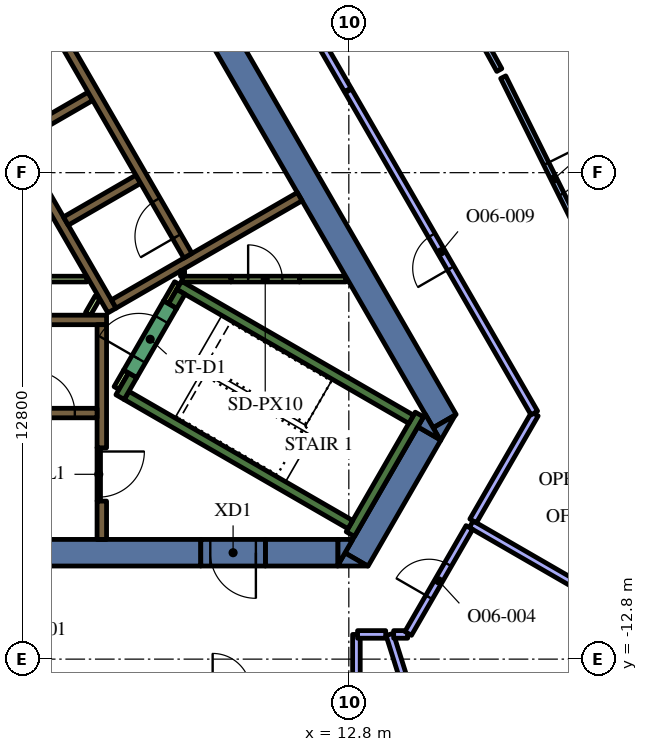
"""IFC4 building model, lengths in metres.
Left out: names, types, materials, properties, quantities, classifications, styles, units other than length and angle.
Written with IfcOpenShell. Run it as: python <this file> out.ifc"""

import sys

from ifc_helpers import new_model, si_unit, direction, frame, frame_2d, origin, place, context, subcontext, project, spatial, polyline, rectangle, outline, extrude, element, fill, save


model = new_model("IFC4")
c1 = context("Model", 3, precision=1e-05, world=origin(), true_north=direction((0.0, 1.0)))
c2 = subcontext(c1, "Body", "Model", "MODEL_VIEW")
j1 = project(units=[si_unit("LENGTHUNIT", "METRE"), si_unit("PLANEANGLEUNIT", "RADIAN")], contexts=[c1])
p1 = place(None, origin())
s1 = spatial("IfcSite", under=j1, at=p1, CompositionType="ELEMENT")
p2 = place(p1, origin())
s2 = spatial("IfcBuilding", under=s1, at=p2, CompositionType="ELEMENT")
p3 = place(p2, frame((0.0, 0.0, 205.8)))
s3 = spatial("IfcBuildingStorey", under=s2, at=p3, CompositionType="ELEMENT", Elevation=205.8)
p4 = place(p3, frame((9.085, 4.264, 0.0), z_axis=(0.0, 0.0, 1.0), x_axis=(0.499998082512, -0.866026510844, 0.0)))
e1 = element("IfcWall", 1, at=p4, inside=s3, PredefinedType="SOLIDWALL", context=c2, shape_type="SweptSolid", body=[
    extrude(rectangle(XDim=12.472, YDim=0.7, at=frame_2d((6.236, 0.0))), origin(), (0.0, 0.0, 1.0), 4.2),
])
p5 = place(p3, origin())
e2 = element("IfcWall", 2, at=p5, inside=s3, PredefinedType="SOLIDWALL", context=c2, shape_type="SweptSolid", body=[
    extrude(outline(polyline([(15.213, -7.05), (15.019, -6.714), (15.601, -6.378), (15.213, -7.05)])), origin(), (0.0, 0.0, 1.0), 4.2),
])
p6 = place(p3, frame((13.003, -10.179, 0.0), z_axis=(0.0, 0.0, 1.0), x_axis=(0.499972675833, 0.866041178825, 0.0)))
e3 = element("IfcWall", 3, at=p6, inside=s3, PredefinedType="SOLIDWALL", context=c2, shape_type="SweptSolid", body=[
    extrude(rectangle(XDim=3.829, YDim=0.7, at=frame_2d((1.915, 0.0))), origin(), (0.0, 0.0, 1.0), 4.2),
])
e4 = element("IfcWall", 4, at=p5, inside=s3, PredefinedType="SOLIDWALL", context=c2, shape_type="SweptSolid", body=[
    extrude(outline(polyline([(12.698, -10.005), (13.296, -10.35), (12.5, -10.35), (12.698, -10.005)])), origin(), (0.0, 0.0, 1.0), 4.2),
])
e5 = element("IfcWall", 5, at=p5, inside=s3, PredefinedType="SOLIDWALL", context=c2, shape_type="SweptSolid", body=[
    extrude(outline(polyline([(14.809, -6.35), (15.197, -7.022), (14.615, -6.686), (14.809, -6.35)])), origin(), (0.0, 0.0, 1.0), 4.2),
])
p7 = place(p3, frame((10.604, -10.0, 0.0), z_axis=(0.0, 0.0, 1.0), x_axis=(1.0, 0.0, 0.0)))
e6 = element("IfcWall", 6, at=p7, inside=s3, PredefinedType="SOLIDWALL", context=c2, shape_type="SweptSolid", body=[
    extrude(rectangle(XDim=1.909, YDim=0.7, at=frame_2d((0.955, 0.0))), origin(), (0.0, 0.0, 1.0), 4.2),
])
e7 = element("IfcWall", 7, at=p5, inside=s3, PredefinedType="SOLIDWALL", context=c2, shape_type="SweptSolid", body=[
    extrude(outline(polyline([(12.904, -9.65), (12.516, -10.322), (12.516, -9.65), (12.904, -9.65)])), origin(), (0.0, 0.0, 1.0), 4.2),
])
p8 = place(p3, frame((-10.556, -10.0, 0.0), z_axis=(0.0, 0.0, 1.0), x_axis=(1.0, 0.0, 0.0)))
e8 = element("IfcWall", 8, at=p8, inside=s3, PredefinedType="SOLIDWALL", context=c2, shape_type="SweptSolid", body=[
    extrude(rectangle(XDim=19.461, YDim=0.7, at=frame_2d((9.73, 0.0))), origin(), (0.0, 0.0, 1.0), 4.2),
])
p9 = place(p3, frame((12.84, -9.511, 0.0), z_axis=(0.0, 0.0, 1.0), x_axis=(0.500048121057, 0.865997619297, 0.0)))
e9 = element("IfcWall", 9, at=p9, inside=s3, PredefinedType="SOLIDWALL", context=c2, shape_type="SweptSolid", body=[
    extrude(rectangle(XDim=3.634, YDim=0.25, at=frame_2d((1.817, 0.0))), origin(), (0.0, 0.0, 1.0), 4.2),
])
p10 = place(p3, frame((12.84, -9.261, 0.0), z_axis=(0.0, 0.0, 1.0), x_axis=(-0.866013990052, 0.500019768644, 0.0)))
e10 = element("IfcWall", 10, at=p10, inside=s3, PredefinedType="SOLIDWALL", context=c2, shape_type="SweptSolid", body=[
    extrude(rectangle(XDim=6.8, YDim=0.25, at=frame_2d((3.4, 0.0))), origin(), (0.0, 0.0, 1.0), 4.2),
])
p11 = place(p3, frame((7.113, -5.33, 0.0), z_axis=(0.0, 0.0, 1.0), x_axis=(-0.499965889992, -0.866045096311, 0.0)))
e11 = element("IfcWall", 11, at=p11, inside=s3, PredefinedType="SOLIDWALL", context=c2, shape_type="SweptSolid", body=[
    extrude(rectangle(XDim=0.666, YDim=0.25, at=frame_2d((0.333, 0.0))), origin(), (0.0, 0.0, 1.0), 4.2),
])
p12 = place(p3, frame((8.334, -2.964, 0.0), z_axis=(0.0, 0.0, 1.0), x_axis=(0.866016039709, -0.500016218704, 0.0)))
e12 = element("IfcWall", 12, at=p12, inside=s3, PredefinedType="SOLIDWALL", context=c2, shape_type="SweptSolid", body=[
    extrude(rectangle(XDim=7.05, YDim=0.25, at=frame_2d((3.525, 0.0))), origin(), (0.0, 0.0, 1.0), 4.2),
])
p13 = place(p3, frame((8.163, -3.511, 0.0), z_axis=(0.0, 0.0, 1.0), x_axis=(0.500127794843, 0.865951608824, 0.0)))
e13 = element("IfcWall", 13, at=p13, inside=s3, PredefinedType="SOLIDWALL", context=c2, shape_type="SweptSolid", body=[
    extrude(rectangle(XDim=0.435, YDim=0.25, at=frame_2d((0.217, 0.0))), origin(), (0.0, 0.0, 1.0), 4.2),
])
p14 = place(p3, frame((-5.806, -3.875, 0.0), z_axis=(0.0, 0.0, 1.0), x_axis=(1.0, 0.0, 0.0)))
e14 = element("IfcWall", 14, at=p14, inside=s3, PredefinedType="SOLIDWALL", context=c2, shape_type="SweptSolid", body=[
    extrude(rectangle(XDim=12.231, YDim=0.25, at=frame_2d((6.116, 0.0))), origin(), (0.0, 0.0, 1.0), 4.2),
])
p15 = place(p3, frame((6.3, -7.24, 0.0), z_axis=(0.0, 0.0, 1.0), x_axis=(0.0, 1.0, 0.0)))
e15 = element("IfcWall", 15, at=p15, inside=s3, PredefinedType="SOLIDWALL", context=c2, shape_type="SweptSolid", body=[
    extrude(rectangle(XDim=3.24, YDim=0.25, at=frame_2d((1.62, 0.0))), origin(), (0.0, 0.0, 1.0), 4.2),
])
p16 = place(p3, frame((6.3, -9.65, 0.0), z_axis=(0.0, 0.0, 1.0), x_axis=(0.0, 1.0, 0.0)))
e16 = element("IfcWall", 16, at=p16, inside=s3, PredefinedType="SOLIDWALL", context=c2, shape_type="SweptSolid", body=[
    extrude(rectangle(XDim=1.008, YDim=0.25, at=frame_2d((0.504, 0.0))), origin(), (0.0, 0.0, 1.0), 4.2),
])
e17 = element("IfcWall", 17, at=p5, inside=s3, PredefinedType="SOLIDWALL", context=c2, shape_type="SweptSolid", body=[
    extrude(outline(polyline([(0.332, 6.925), (0.335, 6.925), (0.335, 6.925), (0.335, 6.925), (0.335, 7.075), (0.335, 7.075), (0.335, 7.075), (0.245, 7.075), (0.035, 7.439), (0.252, 7.564), (0.377, 7.348), (1.512, 5.382), (1.637, 5.165), (2.221, 4.153), (2.771, 3.199), (2.896, 2.983), (3.138, 2.564), (4.031, 1.017), (4.156, 0.801), (5.292, -1.165), (5.417, -1.382), (6.073, -2.519), (6.552, -3.348), (6.677, -3.564), (6.46, -3.689), (0.332, 6.925)])), origin(), (0.0, 0.0, 1.0), 4.2),
])
for number, where, z_axis, x_axis in (
    (18, (4.094, 0.909, 0.0), (0.0, 0.0, 1.0), (0.866, 0.5, 0.0)),
    (19, (5.354, -1.274, 0.0), (0.0, 0.0, 1.0), (0.866, 0.5, 0.0)),
):
    element("IfcWall", number, at=place(p3, frame(where, z_axis=z_axis, x_axis=x_axis)), inside=s3, PredefinedType="SOLIDWALL", context=c2, shape_type="SweptSolid", body=[
        extrude(rectangle(XDim=2.2, YDim=0.25, at=frame_2d((1.1, 0.0))), origin(), (0.0, 0.0, 1.0), 4.2),
    ])
p17 = place(p3, frame((11.507, -0.631, 0.0), z_axis=(0.0, 0.0, 1.0), x_axis=(-0.866011447264, -0.500024172624, 0.0)))
e20 = element("IfcWall", 20, at=p17, inside=s3, PredefinedType="SOLIDWALL", context=c2, shape_type="SweptSolid", body=[
    extrude(rectangle(XDim=5.65, YDim=0.25, at=frame_2d((2.825, 0.0))), origin(), (0.0, 0.0, 1.0), 4.2),
])
p18 = place(p3, frame((3.238, -2.8, 0.0), z_axis=(0.0, 0.0, 1.0), x_axis=(1.0, 0.0, 0.0)))
e21 = element("IfcWall", 21, at=p18, inside=s3, PredefinedType="PARTITIONING", context=c2, shape_type="SweptSolid", body=[
    extrude(rectangle(XDim=2.672, YDim=0.15, at=frame_2d((1.336, 0.0))), origin(), (0.0, 0.0, 1.0), 3.45),
])
p19 = place(p3, frame((8.412, -2.8, 0.0), z_axis=(0.0, 0.0, 1.0), x_axis=(1.0, 0.0, 0.0)))
e22 = element("IfcWall", 22, at=p19, inside=s3, PredefinedType="PARTITIONING", context=c2, shape_type="SweptSolid", body=[
    extrude(rectangle(XDim=1.288, YDim=0.15, at=frame_2d((0.644, 0.0))), origin(), (0.0, 0.0, 1.0), 4.2),
])
p20 = place(p3, frame((8.37, -2.65, 0.0), z_axis=(0.0, 0.0, 1.0), x_axis=(1.0, 0.0, 0.0)))
e23 = element("IfcWall", 23, at=p20, inside=s3, PredefinedType="PARTITIONING", context=c2, shape_type="SweptSolid", body=[
    extrude(rectangle(XDim=0.108, YDim=0.15, at=frame_2d((0.054, 0.0))), origin(), (0.0, 0.0, 1.0), 4.2),
])
p21 = place(p3, frame((8.281, -2.907, 0.0), z_axis=(0.0, 0.0, 1.0), x_axis=(-0.500193841991, -0.86591346013, 0.0)))
e24 = element("IfcWall", 24, at=p21, inside=s3, PredefinedType="PARTITIONING", context=c2, shape_type="SweptSolid", body=[
    extrude(rectangle(XDim=0.583, YDim=0.15, at=frame_2d((0.292, 0.0))), origin(), (0.0, 0.0, 1.0), 4.2),
])
p22 = place(p3, frame((11.5, -2.801, 0.0), z_axis=(0.0, 0.0, 1.0), x_axis=(1.0, 0.0, 0.0)))
e25 = element("IfcWall", 25, at=p22, inside=s3, PredefinedType="PARTITIONING", context=c2, shape_type="SweptSolid", body=[
    extrude(rectangle(XDim=1.222, YDim=0.15, at=frame_2d((0.611, 0.0))), origin(), (0.0, 0.0, 1.0), 3.45),
])
p23 = place(p3, frame((6.688, -5.667, 0.0), z_axis=(0.0, 0.0, 1.0), x_axis=(0.499834152157, 0.86612113491, 0.0)))
e26 = element("IfcWall", 26, at=p23, inside=s3, PredefinedType="PARTITIONING", context=c2, shape_type="SweptSolid", body=[
    extrude(rectangle(XDim=0.505, YDim=0.15, at=frame_2d((0.252, 0.0))), origin(), (0.0, 0.0, 1.0), 3.45),
])
p24 = place(p3, frame((5.936, -3.718, 0.0), z_axis=(0.0, 0.0, 1.0), x_axis=(0.499890179513, 0.866088799389, 0.0)))
e27 = element("IfcWall", 27, at=p24, inside=s3, PredefinedType="PARTITIONING", context=c2, shape_type="SweptSolid", body=[
    extrude(rectangle(XDim=0.504, YDim=0.15, at=frame_2d((0.252, 0.0))), origin(), (0.0, 0.0, 1.0), 3.45),
])
p25 = place(p3, frame((-6.175, -6.325, 0.0), z_axis=(0.0, 0.0, 1.0), x_axis=(1.0, 0.0, 0.0)))
e28 = element("IfcWall", 28, at=p25, inside=s3, PredefinedType="SOLIDWALL", context=c2, shape_type="SweptSolid", body=[
    extrude(rectangle(XDim=12.35, YDim=0.25, at=frame_2d((6.175, 0.0))), origin(), (0.0, 0.0, 1.0), 4.2),
])
p26 = place(p25, frame((0.585, 0.0, 0.0)))
e29 = element("IfcOpeningElement", 29, at=p26, cuts=e28, PredefinedType="OPENING", context=c2, shape_type="SweptSolid", body=[
    extrude(rectangle(XDim=1.1, YDim=2.1, at=frame_2d((0.55, 1.05))), frame((0.0, 0.135, 0.0), z_axis=(0.0, -1.0, 0.0), x_axis=(1.0, 0.0, 0.0)), (0.0, 0.0, 1.0), 0.27),
])
p27 = place(p25, frame((3.105, 0.0, 0.0)))
e30 = element("IfcOpeningElement", 30, at=p27, cuts=e28, PredefinedType="OPENING", context=c2, shape_type="SweptSolid", body=[
    extrude(rectangle(XDim=1.1, YDim=2.1, at=frame_2d((0.55, 1.05))), frame((0.0, 0.135, 0.0), z_axis=(0.0, -1.0, 0.0), x_axis=(1.0, 0.0, 0.0)), (0.0, 0.0, 1.0), 0.27),
])
p28 = place(p25, frame((5.625, 0.0, 0.0)))
e31 = element("IfcOpeningElement", 31, at=p28, cuts=e28, PredefinedType="OPENING", context=c2, shape_type="SweptSolid", body=[
    extrude(rectangle(XDim=1.1, YDim=2.1, at=frame_2d((0.55, 1.05))), frame((0.0, 0.135, 0.0), z_axis=(0.0, -1.0, 0.0), x_axis=(1.0, 0.0, 0.0)), (0.0, 0.0, 1.0), 0.27),
])
p29 = place(p25, frame((8.145, 0.0, 0.0)))
e32 = element("IfcOpeningElement", 32, at=p29, cuts=e28, PredefinedType="OPENING", context=c2, shape_type="SweptSolid", body=[
    extrude(rectangle(XDim=1.1, YDim=2.1, at=frame_2d((0.55, 1.05))), frame((0.0, 0.135, 0.0), z_axis=(0.0, -1.0, 0.0), x_axis=(1.0, 0.0, 0.0)), (0.0, 0.0, 1.0), 0.27),
])
p30 = place(p25, frame((10.665, 0.0, 0.0)))
e33 = element("IfcOpeningElement", 33, at=p30, cuts=e28, PredefinedType="OPENING", context=c2, shape_type="SweptSolid", body=[
    extrude(rectangle(XDim=1.1, YDim=2.1, at=frame_2d((0.55, 1.05))), frame((0.0, 0.135, 0.0), z_axis=(0.0, -1.0, 0.0), x_axis=(1.0, 0.0, 0.0)), (0.0, 0.0, 1.0), 0.27),
])
p31 = place(p3, frame((8.565, -2.185, 0.0), z_axis=(0.0, 0.0, 1.0), x_axis=(-0.499997954832, 0.866026584559, 0.0)))
e34 = element("IfcWall", 34, at=p31, inside=s3, PredefinedType="SOLIDWALL", context=c2, shape_type="SweptSolid", body=[
    extrude(rectangle(XDim=12.35, YDim=0.25, at=frame_2d((6.175, 0.0))), origin(), (0.0, 0.0, 1.0), 4.2),
])
p32 = place(p31, frame((0.585, 0.0, 0.0)))
e35 = element("IfcOpeningElement", 35, at=p32, cuts=e34, PredefinedType="OPENING", context=c2, shape_type="SweptSolid", body=[
    extrude(rectangle(XDim=1.1, YDim=2.1, at=frame_2d((0.55, 1.05))), frame((0.0, 0.135, 0.0), z_axis=(0.0, -1.0, 0.0), x_axis=(1.0, 0.0, 0.0)), (0.0, 0.0, 1.0), 0.27),
])
p33 = place(p3, frame((7.048, -5.292, 0.0), z_axis=(0.0, 0.0, 1.0), x_axis=(0.49994051562, 0.866059744384, 0.0)))
e36 = element("IfcWall", 36, at=p33, inside=s3, PredefinedType="SOLIDWALL", context=c2, shape_type="SweptSolid", body=[
    extrude(rectangle(XDim=2.1, YDim=0.4, at=frame_2d((1.05, 0.0))), origin(), (0.0, 0.0, 1.0), 4.2),
])
p34 = place(p33, frame((0.45, 0.0, 0.0)))
e37 = element("IfcOpeningElement", 37, at=p34, cuts=e36, PredefinedType="OPENING", context=c2, shape_type="SweptSolid", body=[
    extrude(rectangle(XDim=1.2, YDim=2.1, at=frame_2d((0.6, 1.05))), frame((0.0, 0.21, 0.0), z_axis=(0.0, -1.0, 0.0), x_axis=(1.0, 0.0, 0.0)), (0.0, 0.0, 1.0), 0.42),
])
p35 = place(p3, frame((6.22, -7.237, 0.0), z_axis=(0.0, 0.0, 1.0), x_axis=(0.0, -1.0, 0.0)))
e38 = element("IfcWall", 38, at=p35, inside=s3, PredefinedType="PARTITIONING", context=c2, shape_type="SweptSolid", body=[
    extrude(rectangle(XDim=1.4, YDim=0.09, at=frame_2d((0.7, 0.0))), origin(), (0.0, 0.0, 1.0), 3.45),
])
p36 = place(p35, frame((0.1, 0.0, 0.0)))
e39 = element("IfcOpeningElement", 39, at=p36, cuts=e38, PredefinedType="OPENING", context=c2, shape_type="SweptSolid", body=[
    extrude(rectangle(XDim=1.2, YDim=2.1, at=frame_2d((0.6, 1.05))), frame((0.0, 0.055, 0.0), z_axis=(0.0, -1.0, 0.0), x_axis=(1.0, 0.0, 0.0)), (0.0, 0.0, 1.0), 0.11),
])
p37 = place(p3, frame((10.604, -10.0, 0.0), z_axis=(0.0, 0.0, 1.0), x_axis=(-1.0, 0.0, 0.0)))
e40 = element("IfcWall", 40, at=p37, inside=s3, PredefinedType="SOLIDWALL", context=c2, shape_type="SweptSolid", body=[
    extrude(rectangle(XDim=1.7, YDim=0.7, at=frame_2d((0.85, 0.0))), origin(), (0.0, 0.0, 1.0), 4.2),
])
p38 = place(p37, frame((0.25, 0.0, 0.0)))
e41 = element("IfcOpeningElement", 41, at=p38, cuts=e40, PredefinedType="OPENING", context=c2, shape_type="SweptSolid", body=[
    extrude(rectangle(XDim=1.2, YDim=2.1, at=frame_2d((0.6, 1.05))), frame((0.0, 0.36, 0.0), z_axis=(0.0, -1.0, 0.0), x_axis=(1.0, 0.0, 0.0)), (0.0, 0.0, 1.0), 0.72),
])
p39 = place(p3, frame((9.7, -2.8, 0.0), z_axis=(0.0, 0.0, 1.0), x_axis=(1.0, 0.0, 0.0)))
e42 = element("IfcWall", 42, at=p39, inside=s3, PredefinedType="PARTITIONING", context=c2, shape_type="SweptSolid", body=[
    extrude(rectangle(XDim=1.8, YDim=0.15, at=frame_2d((0.9, 0.0))), origin(), (0.0, 0.0, 1.0), 3.45),
])
p40 = place(p39, frame((0.45, 0.0, 0.0)))
e43 = element("IfcOpeningElement", 43, at=p40, cuts=e42, PredefinedType="OPENING", context=c2, shape_type="SweptSolid", body=[
    extrude(rectangle(XDim=0.9, YDim=2.1, at=frame_2d((0.45, 1.05))), frame((0.0, 0.085, 0.0), z_axis=(0.0, -1.0, 0.0), x_axis=(1.0, 0.0, 0.0)), (0.0, 0.0, 1.0), 0.17),
])
p41 = place(p3, frame((13.875, -12.15, 0.0), z_axis=(0.0, 0.0, 1.0), x_axis=(0.3005606746, -0.953762696316, 0.0)))
e44 = element("IfcWall", 44, at=p41, inside=s3, PredefinedType="PARTITIONING", context=c2, shape_type="SweptSolid", body=[
    extrude(rectangle(XDim=6.9, YDim=0.2, at=frame_2d((3.45, 0.0))), origin(), (0.0, 0.0, 1.0), 3.45),
])
p42 = place(p3, frame((13.0, -13.62, 0.0), z_axis=(0.0, 0.0, 1.0), x_axis=(0.0, 1.0, 0.0)))
e45 = element("IfcWall", 45, at=p42, inside=s3, PredefinedType="PARTITIONING", context=c2, shape_type="SweptSolid", body=[
    extrude(rectangle(XDim=1.47, YDim=0.2, at=frame_2d((0.735, 0.0))), origin(), (0.0, 0.0, 1.0), 3.45),
])
p43 = place(p3, frame((13.03, -12.15, 0.0), z_axis=(0.0, 0.0, 1.0), x_axis=(1.0, 0.0, 0.0)))
e46 = element("IfcWall", 46, at=p43, inside=s3, PredefinedType="PARTITIONING", context=c2, shape_type="SweptSolid", body=[
    extrude(rectangle(XDim=0.74, YDim=0.2, at=frame_2d((0.37, 0.0))), origin(), (0.0, 0.0, 1.0), 3.45),
])
p44 = place(p3, frame((16.021, -9.25, 0.0), z_axis=(0.0, 0.0, 1.0), x_axis=(0.86602692059, -0.499997372806, 0.0)))
e47 = element("IfcWall", 47, at=p44, inside=s3, PredefinedType="PARTITIONING", context=c2, shape_type="SweptSolid", body=[
    extrude(rectangle(XDim=6.765, YDim=0.2, at=frame_2d((3.382, 0.0))), origin(), (0.0, 0.0, 1.0), 3.45),
])
p45 = place(p3, frame((13.98, -12.15, 0.0), z_axis=(0.0, 0.0, 1.0), x_axis=(1.0, 0.0, 0.0)))
e48 = element("IfcWall", 48, at=p45, inside=s3, PredefinedType="PARTITIONING", context=c2, shape_type="SweptSolid", body=[
    extrude(rectangle(XDim=0.367, YDim=0.2, at=frame_2d((0.184, 0.0))), origin(), (0.0, 0.0, 1.0), 3.45),
])
p46 = place(p3, frame((14.362, -12.124, 0.0), z_axis=(0.0, 0.0, 1.0), x_axis=(0.500022299258, 0.866012528919, 0.0)))
e49 = element("IfcWall", 49, at=p46, inside=s3, PredefinedType="PARTITIONING", context=c2, shape_type="SweptSolid", body=[
    extrude(rectangle(XDim=3.219, YDim=0.2, at=frame_2d((1.609, 0.0))), origin(), (0.0, 0.0, 1.0), 3.45),
])
p47 = place(p46, frame((1.1, 0.0, 0.0)))
e50 = element("IfcOpeningElement", 50, at=p47, cuts=e49, PredefinedType="OPENING", context=c2, shape_type="SweptSolid", body=[
    extrude(rectangle(XDim=1.0, YDim=2.1, at=frame_2d((0.5, 1.05))), frame((0.0, 0.11, 0.0), z_axis=(0.0, -1.0, 0.0), x_axis=(1.0, 0.0, 0.0)), (0.0, 0.0, 1.0), 0.22),
])
p48 = place(p3, frame((16.863, 2.513, 0.0), z_axis=(0.0, 0.0, 1.0), x_axis=(0.445159947046, -0.895451071553, 0.0)))
e51 = element("IfcWall", 51, at=p48, inside=s3, PredefinedType="PARTITIONING", context=c2, shape_type="SweptSolid", body=[
    extrude(rectangle(XDim=6.043, YDim=0.15, at=frame_2d((3.021, 0.0))), origin(), (0.0, 0.0, 1.0), 3.45),
])
p49 = place(p48, frame((2.542, 0.0, 0.0)))
e52 = element("IfcOpeningElement", 52, at=p49, cuts=e51, PredefinedType="OPENING", context=c2, shape_type="SweptSolid", body=[
    extrude(rectangle(XDim=0.9, YDim=2.1, at=frame_2d((0.45, 1.05))), frame((0.0, 0.085, 0.0), z_axis=(0.0, -1.0, 0.0), x_axis=(1.0, 0.0, 0.0)), (0.0, 0.0, 1.0), 0.17),
])
p50 = place(p3, frame((16.76, 2.7, 0.0), z_axis=(0.0, 0.0, 1.0), x_axis=(-0.481907755985, 0.876221955169, 0.0)))
e53 = element("IfcWall", 53, at=p50, inside=s3, PredefinedType="PARTITIONING", context=c2, shape_type="SweptSolid", body=[
    extrude(rectangle(XDim=5.967, YDim=0.15, at=frame_2d((2.984, 0.0))), origin(), (0.0, 0.0, 1.0), 3.45),
])
p51 = place(p3, frame((12.772, 2.178, 0.0), z_axis=(0.0, 0.0, 1.0), x_axis=(-0.5000018851, 0.866024315419, 0.0)))
e54 = element("IfcWall", 54, at=p51, inside=s3, PredefinedType="PARTITIONING", context=c2, shape_type="SweptSolid", body=[
    extrude(rectangle(XDim=9.0, YDim=0.2, at=frame_2d((4.5, 0.0))), origin(), (0.0, 0.0, 1.0), 3.45),
])
p52 = place(p3, frame((16.072, -9.163, 0.0), z_axis=(0.0, 0.0, 1.0), x_axis=(0.500010870188, 0.866019127788, 0.0)))
e55 = element("IfcWall", 55, at=p52, inside=s3, PredefinedType="PARTITIONING", context=c2, shape_type="SweptSolid", body=[
    extrude(rectangle(XDim=3.249, YDim=0.2, at=frame_2d((1.624, 0.0))), origin(), (0.0, 0.0, 1.0), 3.45),
])
p53 = place(p3, frame((17.681, -6.324, 0.0), z_axis=(0.0, 0.0, 1.0), x_axis=(-0.500021153861, 0.866013190252, 0.0)))
e56 = element("IfcWall", 56, at=p53, inside=s3, PredefinedType="PARTITIONING", context=c2, shape_type="SweptSolid", body=[
    extrude(rectangle(XDim=9.787, YDim=0.2, at=frame_2d((4.894, 0.0))), origin(), (0.0, 0.0, 1.0), 3.45),
])
p54 = place(p53, frame((4.4, 0.0, 0.0)))
e57 = element("IfcOpeningElement", 57, at=p54, cuts=e56, PredefinedType="OPENING", context=c2, shape_type="SweptSolid", body=[
    extrude(rectangle(XDim=1.0, YDim=2.1, at=frame_2d((0.5, 1.05))), frame((0.0, 0.11, 0.0), z_axis=(0.0, -1.0, 0.0), x_axis=(1.0, 0.0, 0.0)), (0.0, 0.0, 1.0), 0.22),
])
p55 = place(p30, origin())
e58 = element("IfcDoor", 58, at=p55, inside=s3, OperationType="DOUBLE_DOOR_SLIDING", PredefinedType="DOOR", context=c2, shape_type="SweptSolid", body=[
    extrude(rectangle(XDim=1.1, YDim=2.1, at=frame_2d((0.55, 1.05))), frame((0.0, 0.025, 0.0), z_axis=(0.0, -1.0, 0.0), x_axis=(1.0, 0.0, 0.0)), (0.0, 0.0, 1.0), 0.05),
])
fill(e33, e58)
p56 = place(p32, origin())
e59 = element("IfcDoor", 59, at=p56, inside=s3, OperationType="DOUBLE_DOOR_SLIDING", PredefinedType="DOOR", context=c2, shape_type="SweptSolid", body=[
    extrude(rectangle(XDim=1.1, YDim=2.1, at=frame_2d((0.55, 1.05))), frame((0.0, 0.025, 0.0), z_axis=(0.0, -1.0, 0.0), x_axis=(1.0, 0.0, 0.0)), (0.0, 0.0, 1.0), 0.05),
])
fill(e35, e59)
p57 = place(p34, origin())
e60 = element("IfcDoor", 60, at=p57, inside=s3, OperationType="SINGLE_SWING_LEFT", PredefinedType="DOOR", context=c2, shape_type="SweptSolid", body=[
    extrude(rectangle(XDim=1.2, YDim=2.1, at=frame_2d((0.6, 1.05))), frame((0.0, 0.025, 0.0), z_axis=(0.0, -1.0, 0.0), x_axis=(1.0, 0.0, 0.0)), (0.0, 0.0, 1.0), 0.05),
])
fill(e37, e60)
p58 = place(p36, origin())
e61 = element("IfcDoor", 61, at=p58, inside=s3, OperationType="SINGLE_SWING_LEFT", PredefinedType="DOOR", context=c2, shape_type="SweptSolid", body=[
    extrude(rectangle(XDim=1.2, YDim=2.1, at=frame_2d((0.6, 1.05))), frame((0.0, 0.025, 0.0), z_axis=(0.0, -1.0, 0.0), x_axis=(1.0, 0.0, 0.0)), (0.0, 0.0, 1.0), 0.05),
])
fill(e39, e61)
p59 = place(p38, origin())
e62 = element("IfcDoor", 62, at=p59, inside=s3, OperationType="SINGLE_SWING_LEFT", PredefinedType="DOOR", context=c2, shape_type="SweptSolid", body=[
    extrude(rectangle(XDim=1.2, YDim=2.1, at=frame_2d((0.6, 1.05))), frame((0.0, 0.025, 0.0), z_axis=(0.0, -1.0, 0.0), x_axis=(1.0, 0.0, 0.0)), (0.0, 0.0, 1.0), 0.05),
])
fill(e41, e62)
p60 = place(p40, origin())
e63 = element("IfcDoor", 63, at=p60, inside=s3, OperationType="SINGLE_SWING_LEFT", PredefinedType="DOOR", context=c2, shape_type="SweptSolid", body=[
    extrude(rectangle(XDim=0.9, YDim=2.1, at=frame_2d((0.45, 1.05))), frame((0.0, 0.025, 0.0), z_axis=(0.0, -1.0, 0.0), x_axis=(1.0, 0.0, 0.0)), (0.0, 0.0, 1.0), 0.05),
])
fill(e43, e63)
p61 = place(p47, origin())
e64 = element("IfcDoor", 64, at=p61, inside=s3, OperationType="SINGLE_SWING_LEFT", PredefinedType="DOOR", context=c2, shape_type="SweptSolid", body=[
    extrude(rectangle(XDim=1.0, YDim=2.1, at=frame_2d((0.5, 1.05))), frame((0.0, 0.025, 0.0), z_axis=(0.0, -1.0, 0.0), x_axis=(1.0, 0.0, 0.0)), (0.0, 0.0, 1.0), 0.05),
])
fill(e50, e64)
p62 = place(p49, origin())
e65 = element("IfcDoor", 65, at=p62, inside=s3, OperationType="SINGLE_SWING_LEFT", PredefinedType="DOOR", context=c2, shape_type="SweptSolid", body=[
    extrude(rectangle(XDim=0.9, YDim=2.1, at=frame_2d((0.45, 1.05))), frame((0.0, 0.025, 0.0), z_axis=(0.0, -1.0, 0.0), x_axis=(1.0, 0.0, 0.0)), (0.0, 0.0, 1.0), 0.05),
])
fill(e52, e65)
p63 = place(p54, origin())
e66 = element("IfcDoor", 66, at=p63, inside=s3, OperationType="SINGLE_SWING_RIGHT", PredefinedType="DOOR", context=c2, shape_type="SweptSolid", body=[
    extrude(rectangle(XDim=1.0, YDim=2.1, at=frame_2d((0.5, 1.05))), frame((0.0, 0.025, 0.0), z_axis=(0.0, -1.0, 0.0), x_axis=(1.0, 0.0, 0.0)), (0.0, 0.0, 1.0), 0.05),
])
fill(e57, e66)
save(model, sys.argv[1])
